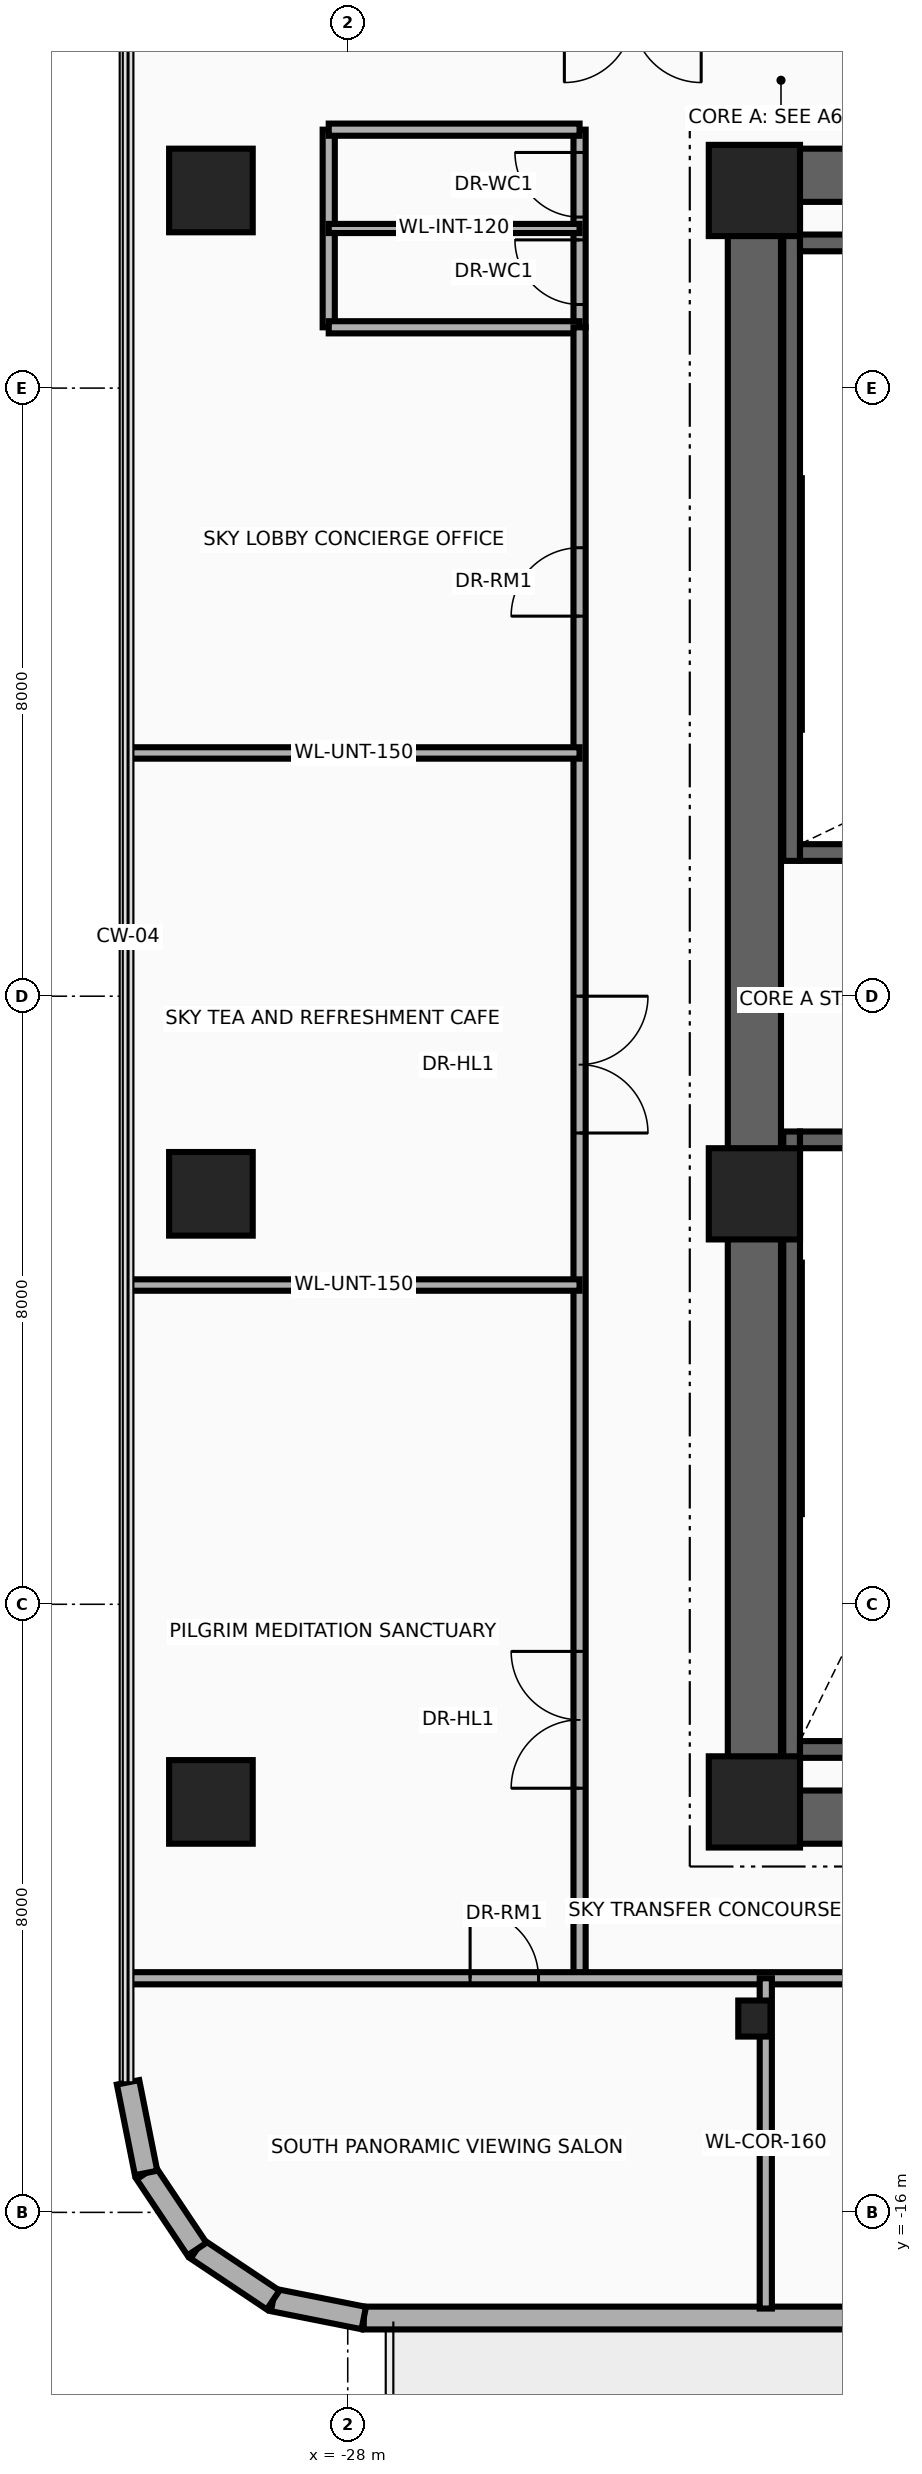
"""IFC4 building model, lengths in metres.
Left out: names, types, materials, properties, quantities, classifications, styles, units other than length and angle.
Written with IfcOpenShell. Run it as: python <this file> out.ifc"""

import sys

from ifc_helpers import new_model, si_unit, direction, frame, frame_2d, origin, origin_2d, place, context, subcontext, project, spatial, rectangle, circle, i_section, extrude, source, transform, mapped, element, fill, save


model = new_model("IFC4")
c1 = context("Model", 3, precision=1e-05, world=origin(), true_north=direction((0.0, 1.0)))
c2 = subcontext(c1, "Body", "Model", "MODEL_VIEW")
j1 = project(units=[si_unit("LENGTHUNIT", "METRE"), si_unit("PLANEANGLEUNIT", "RADIAN")], contexts=[c1])
p1 = place(None, origin())
s1 = spatial("IfcSite", under=j1, at=p1, CompositionType="ELEMENT")
p2 = place(p1, origin())
s2 = spatial("IfcBuilding", under=s1, at=p2, CompositionType="ELEMENT")
p3 = place(p2, frame((0.0, 0.0, 101.1)))
s3 = spatial("IfcBuildingStorey", under=s2, at=p3, CompositionType="ELEMENT", Elevation=101.1)
p4 = place(p3, frame((-22.16, 1.78, 0.0), z_axis=(0.0, 0.0, 1.0), x_axis=(0.0, 1.0, 0.0)))
e1 = element("IfcWall", 1, at=p4, inside=s3, PredefinedType="SHEAR", context=c2, shape_type="SweptSolid", body=[
    extrude(rectangle(XDim=8.67, YDim=0.22, at=frame_2d((4.335, 0.0))), origin(), (0.0, 0.0, 1.0), 4.36),
])
p5 = place(p3, frame((-22.05, 1.89, 0.0), z_axis=(0.0, 0.0, 1.0), x_axis=(1.0, 0.0, 0.0)))
e2 = element("IfcWall", 2, at=p5, inside=s3, PredefinedType="SHEAR", context=c2, shape_type="SweptSolid", body=[
    extrude(rectangle(XDim=3.11, YDim=0.22, at=frame_2d((1.555, 0.0))), origin(), (0.0, 0.0, 1.0), 4.36),
])
p6 = place(p5, frame((1.0, 0.0, 0.0)))
e3 = element("IfcOpeningElement", 3, at=p6, cuts=e2, PredefinedType="OPENING", context=c2, shape_type="SweptSolid", body=[
    extrude(rectangle(XDim=1.1, YDim=2.15, at=frame_2d((0.55, 1.075))), frame((0.0, 0.125, 0.0), z_axis=(0.0, -1.0, 0.0), x_axis=(1.0, 0.0, 0.0)), (0.0, 0.0, 1.0), 0.25),
])
p7 = place(p3, frame((-22.05, 9.91, 0.0), z_axis=(0.0, 0.0, 1.0), x_axis=(1.0, 0.0, 0.0)))
e4 = element("IfcWall", 4, at=p7, inside=s3, PredefinedType="SHEAR", context=c2, shape_type="SweptSolid", body=[
    extrude(rectangle(XDim=3.11, YDim=0.22, at=frame_2d((1.555, 0.0))), origin(), (0.0, 0.0, 1.0), 4.36),
])
p8 = place(p3, frame((-22.16, -10.45, 0.0), z_axis=(0.0, 0.0, 1.0), x_axis=(0.0, 1.0, 0.0)))
e5 = element("IfcWall", 5, at=p8, inside=s3, PredefinedType="SHEAR", context=c2, shape_type="SweptSolid", body=[
    extrude(rectangle(XDim=8.67, YDim=0.22, at=frame_2d((4.335, 0.0))), origin(), (0.0, 0.0, 1.0), 4.36),
])
p9 = place(p3, frame((-22.05, -9.91, 0.0), z_axis=(0.0, 0.0, 1.0), x_axis=(1.0, 0.0, 0.0)))
e6 = element("IfcWall", 6, at=p9, inside=s3, PredefinedType="SHEAR", context=c2, shape_type="SweptSolid", body=[
    extrude(rectangle(XDim=3.11, YDim=0.22, at=frame_2d((1.555, 0.0))), origin(), (0.0, 0.0, 1.0), 4.36),
])
p10 = place(p3, frame((-22.05, -1.89, 0.0), z_axis=(0.0, 0.0, 1.0), x_axis=(1.0, 0.0, 0.0)))
e7 = element("IfcWall", 7, at=p10, inside=s3, PredefinedType="SHEAR", context=c2, shape_type="SweptSolid", body=[
    extrude(rectangle(XDim=3.11, YDim=0.22, at=frame_2d((1.555, 0.0))), origin(), (0.0, 0.0, 1.0), 4.36),
])
p11 = place(p10, frame((1.0, 0.0, 0.0)))
e8 = element("IfcOpeningElement", 8, at=p11, cuts=e7, PredefinedType="OPENING", context=c2, shape_type="SweptSolid", body=[
    extrude(rectangle(XDim=1.1, YDim=2.15, at=frame_2d((0.55, 1.075))), frame((0.0, 0.125, 0.0), z_axis=(0.0, -1.0, 0.0), x_axis=(1.0, 0.0, 0.0)), (0.0, 0.0, 1.0), 0.25),
])
p12 = place(p3, frame((-22.65, -11.15, 0.0), z_axis=(0.0, 0.0, 1.0), x_axis=(0.0, 1.0, 0.0)))
e9 = element("IfcWall", 9, at=p12, inside=s3, PredefinedType="SHEAR", context=c2, shape_type="SweptSolid", body=[
    extrude(rectangle(XDim=22.3, YDim=0.7, at=frame_2d((11.15, 0.0))), origin(), (0.0, 0.0, 1.0), 4.36),
])
for number, where, z_axis, x_axis in (
    (10, (-22.65, 10.8, 0.0), (0.0, 0.0, 1.0), (1.0, 0.0, 0.0)),
    (11, (-22.65, -10.8, 0.0), (0.0, 0.0, 1.0), (1.0, 0.0, 0.0)),
):
    element("IfcWall", number, at=place(p3, frame(where, z_axis=z_axis, x_axis=x_axis)), inside=s3, PredefinedType="SHEAR", context=c2, shape_type="SweptSolid", body=[
        extrude(rectangle(XDim=10.25, YDim=0.7, at=frame_2d((5.125, 0.0))), origin(), (0.0, 0.0, 1.0), 4.36),
    ])
m1 = source(origin(), c2, "Body", "SweptSolid", [
    extrude(circle(Radius=0.55, at=origin_2d()), origin(), (0.0, 0.0, 1.0), 4.6),
])
p13 = place(p3, frame((-29.8, -10.6, 0.0), z_axis=(0.0, 0.0, 1.0), x_axis=(1.0, 0.0, 0.0)))
e12 = element("IfcColumn", 12, at=p13, inside=s3, PredefinedType="COLUMN", context=c2, shape_type="MappedRepresentation", body=[
    mapped(m1, transform((0.0, 0.0, 0.0), x_axis=(1.0, 0.0, 0.0), y_axis=(0.0, 1.0, 0.0), z_axis=(0.0, 0.0, 1.0), scale=1.0)),
])
m2 = source(origin(), c2, "Body", "SweptSolid", [
    extrude(rectangle(XDim=1.2, YDim=1.2, at=origin_2d()), origin(), (0.0, 0.0, 1.0), 4.6),
])
p14 = place(p3, frame((-22.65, -10.6, 0.0), z_axis=(0.0, 0.0, 1.0), x_axis=(1.0, 0.0, 0.0)))
e13 = element("IfcColumn", 13, at=p14, inside=s3, PredefinedType="COLUMN", context=c2, shape_type="MappedRepresentation", body=[
    mapped(m2, transform((0.0, 0.0, 0.0), x_axis=(1.0, 0.0, 0.0), y_axis=(0.0, 1.0, 0.0), z_axis=(0.0, 0.0, 1.0), scale=1.0)),
])
p15 = place(p3, frame((-29.8, -2.6, 0.0), z_axis=(0.0, 0.0, 1.0), x_axis=(1.0, 0.0, 0.0)))
e14 = element("IfcColumn", 14, at=p15, inside=s3, PredefinedType="COLUMN", context=c2, shape_type="MappedRepresentation", body=[
    mapped(m1, transform((0.0, 0.0, 0.0), x_axis=(1.0, 0.0, 0.0), y_axis=(0.0, 1.0, 0.0), z_axis=(0.0, 0.0, 1.0), scale=1.0)),
])
p16 = place(p3, frame((-22.65, -2.6, 0.0), z_axis=(0.0, 0.0, 1.0), x_axis=(1.0, 0.0, 0.0)))
e15 = element("IfcColumn", 15, at=p16, inside=s3, PredefinedType="COLUMN", context=c2, shape_type="MappedRepresentation", body=[
    mapped(m2, transform((0.0, 0.0, 0.0), x_axis=(1.0, 0.0, 0.0), y_axis=(0.0, 1.0, 0.0), z_axis=(0.0, 0.0, 1.0), scale=1.0)),
])
p17 = place(p3, frame((-29.8, 10.6, 0.0), z_axis=(0.0, 0.0, 1.0), x_axis=(1.0, 0.0, 0.0)))
e16 = element("IfcColumn", 16, at=p17, inside=s3, PredefinedType="COLUMN", context=c2, shape_type="MappedRepresentation", body=[
    mapped(m1, transform((0.0, 0.0, 0.0), x_axis=(1.0, 0.0, 0.0), y_axis=(0.0, 1.0, 0.0), z_axis=(0.0, 0.0, 1.0), scale=1.0)),
])
p18 = place(p3, frame((-22.65, 10.6, 0.0), z_axis=(0.0, 0.0, 1.0), x_axis=(1.0, 0.0, 0.0)))
e17 = element("IfcColumn", 17, at=p18, inside=s3, PredefinedType="COLUMN", context=c2, shape_type="MappedRepresentation", body=[
    mapped(m2, transform((0.0, 0.0, 0.0), x_axis=(1.0, 0.0, 0.0), y_axis=(0.0, 1.0, 0.0), z_axis=(0.0, 0.0, 1.0), scale=1.0)),
])
m3 = source(origin(), c2, "Body", "SweptSolid", [
    extrude(i_section(OverallWidth=0.424, OverallDepth=0.474, WebThickness=0.048, FlangeThickness=0.077, at=origin_2d()), origin(), (0.0, 0.0, 1.0), 4.6),
])
p19 = place(p3, frame((-22.65, -13.45, 0.0), z_axis=(0.0, 0.0, 1.0), x_axis=(1.0, 0.0, 0.0)))
e18 = element("IfcColumn", 18, at=p19, inside=s3, PredefinedType="COLUMN", context=c2, shape_type="MappedRepresentation", body=[
    mapped(m3, transform((0.0, 0.0, 0.0), x_axis=(1.0, 0.0, 0.0), y_axis=(0.0, 1.0, 0.0), z_axis=(0.0, 0.0, 1.0), scale=1.0)),
])
p20 = place(p3, frame((-12.711, -17.39, 0.0), z_axis=(0.0, 0.0, 1.0), x_axis=(-1.0, 0.0, 0.0)))
e19 = element("IfcWall", 19, at=p20, inside=s3, PredefinedType="SOLIDWALL", context=c2, shape_type="SweptSolid", body=[
    extrude(rectangle(XDim=15.079, YDim=0.3, at=frame_2d((7.539, 0.0))), origin(), (0.0, 0.0, 1.0), 4.36),
])
p21 = place(p20, frame((7.238, 0.0, 0.0)))
e20 = element("IfcOpeningElement", 20, at=p21, cuts=e19, PredefinedType="OPENING", context=c2, shape_type="SweptSolid", body=[
    extrude(rectangle(XDim=1.2, YDim=2.15, at=frame_2d((0.6, 1.075))), frame((0.0, 0.165, 0.0), z_axis=(0.0, -1.0, 0.0), x_axis=(1.0, 0.0, 0.0)), (0.0, 0.0, 1.0), 0.33),
])
p22 = place(p3, frame((-27.789, -17.39, 0.0), z_axis=(0.0, 0.0, 1.0), x_axis=(-0.980804027463, 0.194996050505, 0.0)))
e21 = element("IfcWall", 21, at=p22, inside=s3, PredefinedType="SOLIDWALL", context=c2, shape_type="SweptSolid", body=[
    extrude(rectangle(XDim=1.216, YDim=0.3, at=frame_2d((0.608, 0.0))), origin(), (0.0, 0.0, 1.0), 4.36),
])
for number, where, z_axis, x_axis in (
    (22, (-28.982, -17.153, 0.0), (0.0, 0.0, 1.0), (-0.831, 0.556, 0.0)),
    (23, (-29.983, -16.483, 0.0), (0.0, 0.0, 1.0), (-0.556, 0.831, 0.0)),
):
    element("IfcWall", number, at=place(p3, frame(where, z_axis=z_axis, x_axis=x_axis)), inside=s3, PredefinedType="SOLIDWALL", context=c2, shape_type="SweptSolid", body=[
        extrude(rectangle(XDim=1.205, YDim=0.3, at=frame_2d((0.603, 0.0))), origin(), (0.0, 0.0, 1.0), 4.36),
    ])
p23 = place(p3, frame((-30.653, -15.482, 0.0), z_axis=(0.0, 0.0, 1.0), x_axis=(-0.194996050505, 0.980804027463, 0.0)))
e24 = element("IfcWall", 24, at=p23, inside=s3, PredefinedType="SOLIDWALL", context=c2, shape_type="SweptSolid", body=[
    extrude(rectangle(XDim=1.216, YDim=0.3, at=frame_2d((0.608, 0.0))), origin(), (0.0, 0.0, 1.0), 4.36),
])
p24 = place(p3, frame((-28.25, 8.8, 0.0), z_axis=(0.0, 0.0, 1.0), x_axis=(0.0, 1.0, 0.0)))
e25 = element("IfcWall", 25, at=p24, inside=s3, PredefinedType="PARTITIONING", context=c2, shape_type="SweptSolid", body=[
    extrude(rectangle(XDim=2.6, YDim=0.16, at=frame_2d((1.3, 0.0))), origin(), (0.0, 0.0, 1.0), 3.566),
])
p25 = place(p3, frame((-24.95, 8.8, 0.0), z_axis=(0.0, 0.0, 1.0), x_axis=(0.0, 1.0, 0.0)))
e26 = element("IfcWall", 26, at=p25, inside=s3, PredefinedType="PARTITIONING", context=c2, shape_type="SweptSolid", body=[
    extrude(rectangle(XDim=2.6, YDim=0.16, at=frame_2d((1.3, 0.0))), origin(), (0.0, 0.0, 1.0), 3.566),
])
p26 = place(p25, frame((0.3, 0.0, 0.0)))
e27 = element("IfcOpeningElement", 27, at=p26, cuts=e26, PredefinedType="OPENING", context=c2, shape_type="SweptSolid", body=[
    extrude(rectangle(XDim=0.85, YDim=2.1, at=frame_2d((0.425, 1.05))), frame((0.0, 0.095, 0.0), z_axis=(0.0, -1.0, 0.0), x_axis=(1.0, 0.0, 0.0)), (0.0, 0.0, 1.0), 0.19),
])
p27 = place(p25, frame((1.45, 0.0, 0.0)))
e28 = element("IfcOpeningElement", 28, at=p27, cuts=e26, PredefinedType="OPENING", context=c2, shape_type="SweptSolid", body=[
    extrude(rectangle(XDim=0.85, YDim=2.1, at=frame_2d((0.425, 1.05))), frame((0.0, 0.095, 0.0), z_axis=(0.0, -1.0, 0.0), x_axis=(1.0, 0.0, 0.0)), (0.0, 0.0, 1.0), 0.19),
])
for number, where, z_axis, x_axis in (
    (29, (-28.25, 8.8, 0.0), (0.0, 0.0, 1.0), (1.0, 0.0, 0.0)),
    (30, (-28.25, 11.4, 0.0), (0.0, 0.0, 1.0), (1.0, 0.0, 0.0)),
):
    element("IfcWall", number, at=place(p3, frame(where, z_axis=z_axis, x_axis=x_axis)), inside=s3, PredefinedType="PARTITIONING", context=c2, shape_type="SweptSolid", body=[
        extrude(rectangle(XDim=3.3, YDim=0.16, at=frame_2d((1.65, 0.0))), origin(), (0.0, 0.0, 1.0), 4.36),
    ])
p28 = place(p3, frame((-28.25, 10.1, 0.0), z_axis=(0.0, 0.0, 1.0), x_axis=(1.0, 0.0, 0.0)))
e31 = element("IfcWall", 31, at=p28, inside=s3, PredefinedType="PARTITIONING", context=c2, shape_type="SweptSolid", body=[
    extrude(rectangle(XDim=3.3, YDim=0.12, at=frame_2d((1.65, 0.0))), origin(), (0.0, 0.0, 1.0), 4.36),
])
p29 = place(p3, frame((-24.95, -12.92, 0.0), z_axis=(0.0, 0.0, 1.0), x_axis=(0.0, 1.0, 0.0)))
e32 = element("IfcWall", 32, at=p29, inside=s3, PredefinedType="PARTITIONING", context=c2, shape_type="SweptSolid", body=[
    extrude(rectangle(XDim=21.72, YDim=0.16, at=frame_2d((10.86, 0.0))), origin(), (0.0, 0.0, 1.0), 3.566),
])
p30 = place(p29, frame((2.5, 0.0, 0.0)))
e33 = element("IfcOpeningElement", 33, at=p30, cuts=e32, PredefinedType="OPENING", context=c2, shape_type="SweptSolid", body=[
    extrude(rectangle(XDim=1.8, YDim=2.15, at=frame_2d((0.9, 1.075))), frame((0.0, 0.095, 0.0), z_axis=(0.0, -1.0, 0.0), x_axis=(1.0, 0.0, 0.0)), (0.0, 0.0, 1.0), 0.19),
])
p31 = place(p29, frame((11.12, 0.0, 0.0)))
e34 = element("IfcOpeningElement", 34, at=p31, cuts=e32, PredefinedType="OPENING", context=c2, shape_type="SweptSolid", body=[
    extrude(rectangle(XDim=1.8, YDim=2.15, at=frame_2d((0.9, 1.075))), frame((0.0, 0.095, 0.0), z_axis=(0.0, -1.0, 0.0), x_axis=(1.0, 0.0, 0.0)), (0.0, 0.0, 1.0), 0.19),
])
p32 = place(p29, frame((17.92, 0.0, 0.0)))
e35 = element("IfcOpeningElement", 35, at=p32, cuts=e32, PredefinedType="OPENING", context=c2, shape_type="SweptSolid", body=[
    extrude(rectangle(XDim=0.9, YDim=2.1, at=frame_2d((0.45, 1.05))), frame((0.0, 0.095, 0.0), z_axis=(0.0, -1.0, 0.0), x_axis=(1.0, 0.0, 0.0)), (0.0, 0.0, 1.0), 0.19),
])
for number, where, z_axis, x_axis in (
    (36, (-30.89, -3.8, 0.0), (0.0, 0.0, 1.0), (1.0, 0.0, 0.0)),
    (37, (-30.89, 3.2, 0.0), (0.0, 0.0, 1.0), (1.0, 0.0, 0.0)),
):
    element("IfcWall", number, at=place(p3, frame(where, z_axis=z_axis, x_axis=x_axis)), inside=s3, PredefinedType="PARTITIONING", context=c2, shape_type="SweptSolid", body=[
        extrude(rectangle(XDim=5.94, YDim=0.15, at=frame_2d((2.97, 0.0))), origin(), (0.0, 0.0, 1.0), 3.796),
    ])
p33 = place(p3, frame((-30.89, -12.92, 0.0), z_axis=(0.0, 0.0, 1.0), x_axis=(1.0, 0.0, 0.0)))
e38 = element("IfcWall", 38, at=p33, inside=s3, PredefinedType="PARTITIONING", context=c2, shape_type="SweptSolid", body=[
    extrude(rectangle(XDim=21.28, YDim=0.16, at=frame_2d((10.64, 0.0))), origin(), (0.0, 0.0, 1.0), 3.734),
])
p34 = place(p33, frame((4.5, 0.0, 0.0)))
e39 = element("IfcOpeningElement", 39, at=p34, cuts=e38, PredefinedType="OPENING", context=c2, shape_type="SweptSolid", body=[
    extrude(rectangle(XDim=0.9, YDim=2.1, at=frame_2d((0.45, 1.05))), frame((0.0, 0.095, 0.0), z_axis=(0.0, -1.0, 0.0), x_axis=(1.0, 0.0, 0.0)), (0.0, 0.0, 1.0), 0.19),
])
p35 = place(p3, frame((-22.5, -17.265, 0.0), z_axis=(0.0, 0.0, 1.0), x_axis=(0.0, 1.0, 0.0)))
e40 = element("IfcWall", 40, at=p35, inside=s3, PredefinedType="PARTITIONING", context=c2, shape_type="SweptSolid", body=[
    extrude(rectangle(XDim=4.345, YDim=0.16, at=frame_2d((2.172, 0.0))), origin(), (0.0, 0.0, 1.0), 3.734),
])
p36 = place(p26, origin())
e41 = element("IfcDoor", 41, at=p36, inside=s3, OperationType="SINGLE_SWING_RIGHT", PredefinedType="DOOR", context=c2, shape_type="SweptSolid", body=[
    extrude(rectangle(XDim=0.85, YDim=2.1, at=frame_2d((0.425, 1.05))), frame((0.0, 0.025, 0.0), z_axis=(0.0, -1.0, 0.0), x_axis=(1.0, 0.0, 0.0)), (0.0, 0.0, 1.0), 0.05),
])
fill(e27, e41)
p37 = place(p27, origin())
e42 = element("IfcDoor", 42, at=p37, inside=s3, OperationType="SINGLE_SWING_LEFT", PredefinedType="DOOR", context=c2, shape_type="SweptSolid", body=[
    extrude(rectangle(XDim=0.85, YDim=2.1, at=frame_2d((0.425, 1.05))), frame((0.0, 0.025, 0.0), z_axis=(0.0, -1.0, 0.0), x_axis=(1.0, 0.0, 0.0)), (0.0, 0.0, 1.0), 0.05),
])
fill(e28, e42)
p38 = place(p30, origin())
e43 = element("IfcDoor", 43, at=p38, inside=s3, OperationType="DOUBLE_DOOR_SINGLE_SWING", PredefinedType="DOOR", context=c2, shape_type="SweptSolid", body=[
    extrude(rectangle(XDim=1.8, YDim=2.15, at=frame_2d((0.9, 1.075))), frame((0.0, 0.025, 0.0), z_axis=(0.0, -1.0, 0.0), x_axis=(1.0, 0.0, 0.0)), (0.0, 0.0, 1.0), 0.05),
])
fill(e33, e43)
p39 = place(p31, frame((1.8, 0.0, 0.0), z_axis=(0.0, 0.0, 1.0), x_axis=(-1.0, 0.0, 0.0)))
e44 = element("IfcDoor", 44, at=p39, inside=s3, OperationType="DOUBLE_DOOR_SINGLE_SWING", PredefinedType="DOOR", context=c2, shape_type="SweptSolid", body=[
    extrude(rectangle(XDim=1.8, YDim=2.15, at=frame_2d((0.9, 1.075))), frame((0.0, 0.025, 0.0), z_axis=(0.0, -1.0, 0.0), x_axis=(1.0, 0.0, 0.0)), (0.0, 0.0, 1.0), 0.05),
])
fill(e34, e44)
p40 = place(p32, origin())
e45 = element("IfcDoor", 45, at=p40, inside=s3, OperationType="SINGLE_SWING_RIGHT", PredefinedType="DOOR", context=c2, shape_type="SweptSolid", body=[
    extrude(rectangle(XDim=0.9, YDim=2.1, at=frame_2d((0.45, 1.05))), frame((0.0, 0.025, 0.0), z_axis=(0.0, -1.0, 0.0), x_axis=(1.0, 0.0, 0.0)), (0.0, 0.0, 1.0), 0.05),
])
fill(e35, e45)
p41 = place(p34, origin())
e46 = element("IfcDoor", 46, at=p41, inside=s3, OperationType="SINGLE_SWING_RIGHT", PredefinedType="DOOR", context=c2, shape_type="SweptSolid", body=[
    extrude(rectangle(XDim=0.9, YDim=2.1, at=frame_2d((0.45, 1.05))), frame((0.0, 0.025, 0.0), z_axis=(0.0, -1.0, 0.0), x_axis=(1.0, 0.0, 0.0)), (0.0, 0.0, 1.0), 0.05),
])
fill(e39, e46)
save(model, sys.argv[1])
